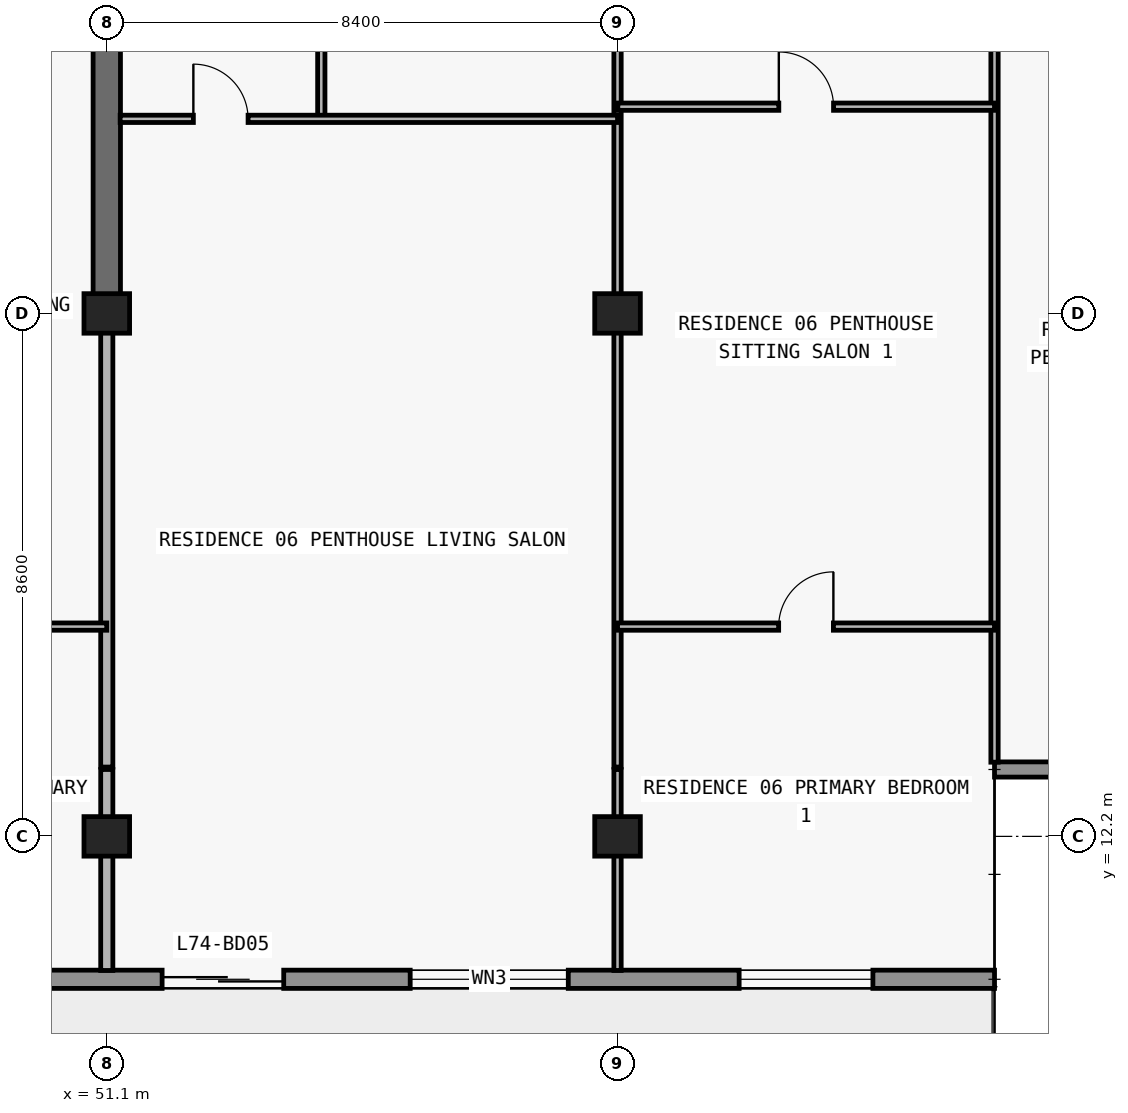
"""IFC4 building model, lengths in metres.
Left out: names, types, materials, properties, quantities, classifications, styles, units other than length and angle.
Written with IfcOpenShell. Run it as: python <this file> out.ifc"""

import sys

from ifc_helpers import new_model, si_unit, direction, frame, frame_2d, origin, origin_2d, place, context, subcontext, project, spatial, rectangle, extrude, element, fill, save


model = new_model("IFC4")
c1 = context("Model", 3, precision=1e-05, world=origin(), true_north=direction((0.0, 1.0)))
c2 = subcontext(c1, "Body", "Model", "MODEL_VIEW")
j1 = project(units=[si_unit("LENGTHUNIT", "METRE"), si_unit("PLANEANGLEUNIT", "RADIAN")], contexts=[c1])
p1 = place(None, origin())
s1 = spatial("IfcSite", under=j1, at=p1, CompositionType="ELEMENT")
p2 = place(p1, origin())
s2 = spatial("IfcBuilding", under=s1, at=p2, CompositionType="ELEMENT")
p3 = place(p2, frame((0.0, 0.0, 262.8)))
s3 = spatial("IfcBuildingStorey", under=s2, at=p3, CompositionType="ELEMENT", Elevation=262.8)
for number, where, z_axis, x_axis in (
    (1, (51.1, 12.2, 0.0), (0.0, 0.0, 1.0), (1.0, 0.0, 0.0)),
    (2, (59.5, 12.2, 0.0), (0.0, 0.0, 1.0), (1.0, 0.0, 0.0)),
    (3, (51.1, 20.8, 0.0), (0.0, 0.0, 1.0), (1.0, 0.0, 0.0)),
    (4, (59.5, 20.8, 0.0), (0.0, 0.0, 1.0), (1.0, 0.0, 0.0)),
):
    element("IfcColumn", number, at=place(p3, frame(where, z_axis=z_axis, x_axis=x_axis)), inside=s3, PredefinedType="COLUMN", context=c2, shape_type="SweptSolid", body=[
        extrude(rectangle(XDim=0.75, YDim=0.65, at=origin_2d()), origin(), (0.0, 0.0, 1.0), 3.05),
    ])
p4 = place(p3, frame((51.1, 20.8, 0.0), z_axis=(0.0, 0.0, 1.0), x_axis=(0.0, 1.0, 0.0)))
e5 = element("IfcWall", 5, at=p4, inside=s3, PredefinedType="SHEAR", context=c2, shape_type="SweptSolid", body=[
    extrude(rectangle(XDim=8.6, YDim=0.45, at=frame_2d((4.3, 0.0))), origin(), (0.0, 0.0, 1.0), 3.05),
])
p5 = place(p3, frame((65.7, 9.85, 0.0), z_axis=(0.0, 0.0, 1.0), x_axis=(-1.0, 0.0, 0.0)))
e6 = element("IfcWall", 6, at=p5, inside=s3, PredefinedType="STANDARD", context=c2, shape_type="SweptSolid", body=[
    extrude(rectangle(XDim=53.6, YDim=0.3, at=frame_2d((26.8, 0.0))), origin(), (0.0, 0.0, 1.0), 3.05),
])
p6 = place(p5, frame((48.05, 0.0, 0.85)))
e7 = element("IfcOpeningElement", 7, at=p6, cuts=e6, PredefinedType="OPENING", context=c2, shape_type="SweptSolid", body=[
    extrude(rectangle(XDim=1.8, YDim=1.55, at=frame_2d((0.9, 0.775))), frame((0.0, 0.16, 0.0), z_axis=(0.0, -1.0, 0.0), x_axis=(1.0, 0.0, 0.0)), (0.0, 0.0, 1.0), 0.32),
])
p7 = place(p5, frame((44.09, 0.0, 0.0)))
e8 = element("IfcOpeningElement", 8, at=p7, cuts=e6, PredefinedType="OPENING", context=c2, shape_type="SweptSolid", body=[
    extrude(rectangle(XDim=2.0, YDim=2.3, at=frame_2d((1.0, 1.15))), frame((0.0, 0.16, 0.0), z_axis=(0.0, -1.0, 0.0), x_axis=(1.0, 0.0, 0.0)), (0.0, 0.0, 1.0), 0.32),
])
p8 = place(p5, frame((39.99, 0.0, 0.85)))
e9 = element("IfcOpeningElement", 9, at=p8, cuts=e6, PredefinedType="OPENING", context=c2, shape_type="SweptSolid", body=[
    extrude(rectangle(XDim=1.8, YDim=1.55, at=frame_2d((0.9, 0.775))), frame((0.0, 0.16, 0.0), z_axis=(0.0, -1.0, 0.0), x_axis=(1.0, 0.0, 0.0)), (0.0, 0.0, 1.0), 0.32),
])
p9 = place(p5, frame((36.026, 0.0, 0.0)))
e10 = element("IfcOpeningElement", 10, at=p9, cuts=e6, PredefinedType="OPENING", context=c2, shape_type="SweptSolid", body=[
    extrude(rectangle(XDim=2.0, YDim=2.3, at=frame_2d((1.0, 1.15))), frame((0.0, 0.16, 0.0), z_axis=(0.0, -1.0, 0.0), x_axis=(1.0, 0.0, 0.0)), (0.0, 0.0, 1.0), 0.32),
])
p10 = place(p5, frame((31.726, 0.0, 0.85)))
e11 = element("IfcOpeningElement", 11, at=p10, cuts=e6, PredefinedType="OPENING", context=c2, shape_type="SweptSolid", body=[
    extrude(rectangle(XDim=2.2, YDim=1.55, at=frame_2d((1.1, 0.775))), frame((0.0, 0.16, 0.0), z_axis=(0.0, -1.0, 0.0), x_axis=(1.0, 0.0, 0.0)), (0.0, 0.0, 1.0), 0.32),
])
p11 = place(p5, frame((27.51, 0.0, 0.0)))
e12 = element("IfcOpeningElement", 12, at=p11, cuts=e6, PredefinedType="OPENING", context=c2, shape_type="SweptSolid", body=[
    extrude(rectangle(XDim=2.0, YDim=2.3, at=frame_2d((1.0, 1.15))), frame((0.0, 0.16, 0.0), z_axis=(0.0, -1.0, 0.0), x_axis=(1.0, 0.0, 0.0)), (0.0, 0.0, 1.0), 0.32),
])
p12 = place(p5, frame((23.81, 0.0, 0.85)))
e13 = element("IfcOpeningElement", 13, at=p12, cuts=e6, PredefinedType="OPENING", context=c2, shape_type="SweptSolid", body=[
    extrude(rectangle(XDim=1.8, YDim=1.55, at=frame_2d((0.9, 0.775))), frame((0.0, 0.16, 0.0), z_axis=(0.0, -1.0, 0.0), x_axis=(1.0, 0.0, 0.0)), (0.0, 0.0, 1.0), 0.32),
])
p13 = place(p5, frame((20.026, 0.0, 0.0)))
e14 = element("IfcOpeningElement", 14, at=p13, cuts=e6, PredefinedType="OPENING", context=c2, shape_type="SweptSolid", body=[
    extrude(rectangle(XDim=2.0, YDim=2.3, at=frame_2d((1.0, 1.15))), frame((0.0, 0.16, 0.0), z_axis=(0.0, -1.0, 0.0), x_axis=(1.0, 0.0, 0.0)), (0.0, 0.0, 1.0), 0.32),
])
p14 = place(p5, frame((15.726, 0.0, 0.85)))
e15 = element("IfcOpeningElement", 15, at=p14, cuts=e6, PredefinedType="OPENING", context=c2, shape_type="SweptSolid", body=[
    extrude(rectangle(XDim=2.2, YDim=1.55, at=frame_2d((1.1, 0.775))), frame((0.0, 0.16, 0.0), z_axis=(0.0, -1.0, 0.0), x_axis=(1.0, 0.0, 0.0)), (0.0, 0.0, 1.0), 0.32),
])
p15 = place(p5, frame((11.69, 0.0, 0.0)))
e16 = element("IfcOpeningElement", 16, at=p15, cuts=e6, PredefinedType="OPENING", context=c2, shape_type="SweptSolid", body=[
    extrude(rectangle(XDim=2.0, YDim=2.3, at=frame_2d((1.0, 1.15))), frame((0.0, 0.16, 0.0), z_axis=(0.0, -1.0, 0.0), x_axis=(1.0, 0.0, 0.0)), (0.0, 0.0, 1.0), 0.32),
])
p16 = place(p5, frame((7.01, 0.0, 0.65)))
e17 = element("IfcOpeningElement", 17, at=p16, cuts=e6, PredefinedType="OPENING", context=c2, shape_type="SweptSolid", body=[
    extrude(rectangle(XDim=2.6, YDim=1.85, at=frame_2d((1.3, 0.925))), frame((0.0, 0.16, 0.0), z_axis=(0.0, -1.0, 0.0), x_axis=(1.0, 0.0, 0.0)), (0.0, 0.0, 1.0), 0.32),
])
p17 = place(p5, frame((2.0, 0.0, 0.85)))
e18 = element("IfcOpeningElement", 18, at=p17, cuts=e6, PredefinedType="OPENING", context=c2, shape_type="SweptSolid", body=[
    extrude(rectangle(XDim=2.2, YDim=1.55, at=frame_2d((1.1, 0.775))), frame((0.0, 0.16, 0.0), z_axis=(0.0, -1.0, 0.0), x_axis=(1.0, 0.0, 0.0)), (0.0, 0.0, 1.0), 0.32),
])
p18 = place(p3, frame((65.7, 13.3, 0.0), z_axis=(0.0, 0.0, 1.0), x_axis=(1.0, 0.0, 0.0)))
e19 = element("IfcWall", 19, at=p18, inside=s3, PredefinedType="ELEMENTEDWALL", context=c2, shape_type="SweptSolid", body=[
    extrude(rectangle(XDim=3.85, YDim=0.25, at=frame_2d((1.925, 0.0))), origin(), (0.0, 0.0, 1.0), 3.05),
])
p19 = place(p3, frame((51.1, 9.995, 0.0), z_axis=(0.0, 0.0, 1.0), x_axis=(0.0, 1.0, 0.0)))
e20 = element("IfcWall", 20, at=p19, inside=s3, PredefinedType="PARTITIONING", context=c2, shape_type="SweptSolid", body=[
    extrude(rectangle(XDim=3.305, YDim=0.2, at=frame_2d((1.652, 0.0))), origin(), (0.0, 0.0, 1.0), 2.263),
])
p20 = place(p3, frame((51.1, 13.34, 0.0), z_axis=(0.0, 0.0, 1.0), x_axis=(0.0, 1.0, 0.0)))
e21 = element("IfcWall", 21, at=p20, inside=s3, PredefinedType="PARTITIONING", context=c2, shape_type="SweptSolid", body=[
    extrude(rectangle(XDim=7.455, YDim=0.2, at=frame_2d((3.728, 0.0))), origin(), (0.0, 0.0, 1.0), 2.263),
])
p21 = place(p3, frame((54.628, 24.0, 0.0), z_axis=(0.0, 0.0, 1.0), x_axis=(0.0, 1.0, 0.0)))
e22 = element("IfcWall", 22, at=p21, inside=s3, PredefinedType="PARTITIONING", context=c2, shape_type="SweptSolid", body=[
    extrude(rectangle(XDim=1.23, YDim=0.12, at=frame_2d((0.615, 0.0))), origin(), (0.0, 0.0, 1.0), 3.05),
])
p22 = place(p3, frame((59.5, 9.995, 0.0), z_axis=(0.0, 0.0, 1.0), x_axis=(0.0, 1.0, 0.0)))
e23 = element("IfcWall", 23, at=p22, inside=s3, PredefinedType="PARTITIONING", context=c2, shape_type="SweptSolid", body=[
    extrude(rectangle(XDim=3.305, YDim=0.12, at=frame_2d((1.652, 0.0))), origin(), (0.0, 0.0, 1.0), 2.263),
])
p23 = place(p3, frame((59.5, 13.34, 0.0), z_axis=(0.0, 0.0, 1.0), x_axis=(0.0, 1.0, 0.0)))
e24 = element("IfcWall", 24, at=p23, inside=s3, PredefinedType="PARTITIONING", context=c2, shape_type="SweptSolid", body=[
    extrude(rectangle(XDim=11.89, YDim=0.12, at=frame_2d((5.945, 0.0))), origin(), (0.0, 0.0, 1.0), 2.263),
])
p24 = place(p3, frame((65.7, 13.42, 0.0), z_axis=(0.0, 0.0, 1.0), x_axis=(0.0, 1.0, 0.0)))
e25 = element("IfcWall", 25, at=p24, inside=s3, PredefinedType="PARTITIONING", context=c2, shape_type="SweptSolid", body=[
    extrude(rectangle(XDim=11.81, YDim=0.12, at=frame_2d((5.905, 0.0))), origin(), (0.0, 0.0, 1.0), 2.629),
])
p25 = place(p3, frame((46.648, 15.65, 0.0), z_axis=(0.0, 0.0, 1.0), x_axis=(1.0, 0.0, 0.0)))
e26 = element("IfcWall", 26, at=p25, inside=s3, PredefinedType="PARTITIONING", context=c2, shape_type="SweptSolid", body=[
    extrude(rectangle(XDim=4.452, YDim=0.12, at=frame_2d((2.226, 0.0))), origin(), (0.0, 0.0, 1.0), 3.05),
])
p26 = place(p25, frame((1.776, 0.0, 0.0)))
e27 = element("IfcOpeningElement", 27, at=p26, cuts=e26, PredefinedType="OPENING", context=c2, shape_type="SweptSolid", body=[
    extrude(rectangle(XDim=0.9, YDim=2.15, at=frame_2d((0.45, 1.075))), frame((0.0, 0.07, 0.0), z_axis=(0.0, -1.0, 0.0), x_axis=(1.0, 0.0, 0.0)), (0.0, 0.0, 1.0), 0.14),
])
p27 = place(p3, frame((59.5, 15.65, 0.0), z_axis=(0.0, 0.0, 1.0), x_axis=(1.0, 0.0, 0.0)))
e28 = element("IfcWall", 28, at=p27, inside=s3, PredefinedType="PARTITIONING", context=c2, shape_type="SweptSolid", body=[
    extrude(rectangle(XDim=6.2, YDim=0.12, at=frame_2d((3.1, 0.0))), origin(), (0.0, 0.0, 1.0), 3.05),
])
p28 = place(p27, frame((2.65, 0.0, 0.0)))
e29 = element("IfcOpeningElement", 29, at=p28, cuts=e28, PredefinedType="OPENING", context=c2, shape_type="SweptSolid", body=[
    extrude(rectangle(XDim=0.9, YDim=2.15, at=frame_2d((0.45, 1.075))), frame((0.0, 0.07, 0.0), z_axis=(0.0, -1.0, 0.0), x_axis=(1.0, 0.0, 0.0)), (0.0, 0.0, 1.0), 0.14),
])
p29 = place(p3, frame((51.32, 24.0, 0.0), z_axis=(0.0, 0.0, 1.0), x_axis=(1.0, 0.0, 0.0)))
e30 = element("IfcWall", 30, at=p29, inside=s3, PredefinedType="PARTITIONING", context=c2, shape_type="SweptSolid", body=[
    extrude(rectangle(XDim=8.18, YDim=0.12, at=frame_2d((4.09, 0.0))), origin(), (0.0, 0.0, 1.0), 3.05),
])
p30 = place(p29, frame((1.204, 0.0, 0.0)))
e31 = element("IfcOpeningElement", 31, at=p30, cuts=e30, PredefinedType="OPENING", context=c2, shape_type="SweptSolid", body=[
    extrude(rectangle(XDim=0.9, YDim=2.15, at=frame_2d((0.45, 1.075))), frame((0.0, 0.07, 0.0), z_axis=(0.0, -1.0, 0.0), x_axis=(1.0, 0.0, 0.0)), (0.0, 0.0, 1.0), 0.14),
])
p31 = place(p3, frame((59.505, 24.2, 0.0), z_axis=(0.0, 0.0, 1.0), x_axis=(1.0, 0.0, 0.0)))
e32 = element("IfcWall", 32, at=p31, inside=s3, PredefinedType="PARTITIONING", context=c2, shape_type="SweptSolid", body=[
    extrude(rectangle(XDim=6.195, YDim=0.12, at=frame_2d((3.098, 0.0))), origin(), (0.0, 0.0, 1.0), 3.05),
])
p32 = place(p31, frame((2.647, 0.0, 0.0)))
e33 = element("IfcOpeningElement", 33, at=p32, cuts=e32, PredefinedType="OPENING", context=c2, shape_type="SweptSolid", body=[
    extrude(rectangle(XDim=0.9, YDim=2.15, at=frame_2d((0.45, 1.075))), frame((0.0, 0.07, 0.0), z_axis=(0.0, -1.0, 0.0), x_axis=(1.0, 0.0, 0.0)), (0.0, 0.0, 1.0), 0.14),
])
p33 = place(p15, origin())
e34 = element("IfcDoor", 34, at=p33, inside=s3, OperationType="DOUBLE_DOOR_SLIDING", PredefinedType="DOOR", context=c2, shape_type="SweptSolid", body=[
    extrude(rectangle(XDim=2.0, YDim=2.3, at=frame_2d((1.0, 1.15))), frame((0.0, 0.025, 0.0), z_axis=(0.0, -1.0, 0.0), x_axis=(1.0, 0.0, 0.0)), (0.0, 0.0, 1.0), 0.05),
])
fill(e16, e34)
p34 = place(p16, origin())
e35 = element("IfcWindow", 35, at=p34, inside=s3, PartitioningType="SINGLE_PANEL", PredefinedType="WINDOW", context=c2, shape_type="SweptSolid", body=[
    extrude(rectangle(XDim=2.6, YDim=1.85, at=frame_2d((1.3, 0.925))), frame((0.0, 0.03, 0.0), z_axis=(0.0, -1.0, 0.0), x_axis=(1.0, 0.0, 0.0)), (0.0, 0.0, 1.0), 0.06),
])
fill(e17, e35)
p35 = place(p17, origin())
e36 = element("IfcWindow", 36, at=p35, inside=s3, PartitioningType="SINGLE_PANEL", PredefinedType="WINDOW", context=c2, shape_type="SweptSolid", body=[
    extrude(rectangle(XDim=2.2, YDim=1.55, at=frame_2d((1.1, 0.775))), frame((0.0, 0.03, 0.0), z_axis=(0.0, -1.0, 0.0), x_axis=(1.0, 0.0, 0.0)), (0.0, 0.0, 1.0), 0.06),
])
fill(e18, e36)
p36 = place(p30, origin())
e37 = element("IfcDoor", 37, at=p36, inside=s3, OperationType="SINGLE_SWING_LEFT", PredefinedType="DOOR", context=c2, shape_type="SweptSolid", body=[
    extrude(rectangle(XDim=0.9, YDim=2.15, at=frame_2d((0.45, 1.075))), frame((0.0, 0.025, 0.0), z_axis=(0.0, -1.0, 0.0), x_axis=(1.0, 0.0, 0.0)), (0.0, 0.0, 1.0), 0.05),
])
fill(e31, e37)
p37 = place(p32, origin())
e38 = element("IfcDoor", 38, at=p37, inside=s3, OperationType="SINGLE_SWING_LEFT", PredefinedType="DOOR", context=c2, shape_type="SweptSolid", body=[
    extrude(rectangle(XDim=0.9, YDim=2.15, at=frame_2d((0.45, 1.075))), frame((0.0, 0.025, 0.0), z_axis=(0.0, -1.0, 0.0), x_axis=(1.0, 0.0, 0.0)), (0.0, 0.0, 1.0), 0.05),
])
fill(e33, e38)
p38 = place(p28, origin())
e39 = element("IfcDoor", 39, at=p38, inside=s3, OperationType="SINGLE_SWING_RIGHT", PredefinedType="DOOR", context=c2, shape_type="SweptSolid", body=[
    extrude(rectangle(XDim=0.9, YDim=2.15, at=frame_2d((0.45, 1.075))), frame((0.0, 0.025, 0.0), z_axis=(0.0, -1.0, 0.0), x_axis=(1.0, 0.0, 0.0)), (0.0, 0.0, 1.0), 0.05),
])
fill(e29, e39)
save(model, sys.argv[1])
